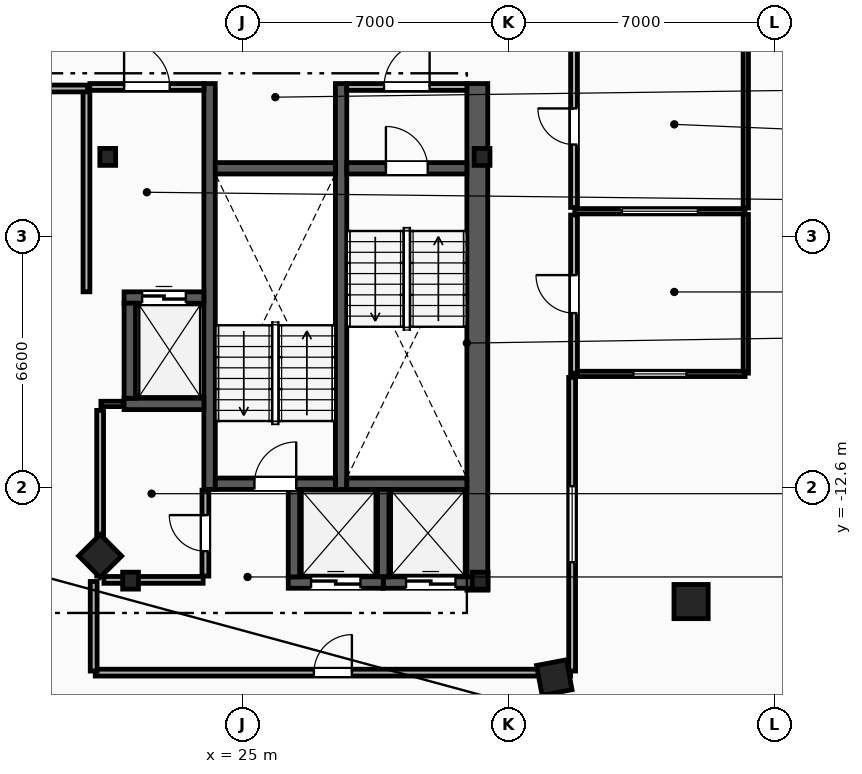
"""IFC4 building model, lengths in metres.
Left out: names, types, materials, properties, quantities, classifications, styles, units other than length and angle.
Written with IfcOpenShell. Run it as: python <this file> out.ifc"""

import sys

from ifc_helpers import new_model, si_unit, direction, frame, frame_2d, origin, origin_2d, place, context, subcontext, project, spatial, rectangle, i_section, extrude, element, fill, save


model = new_model("IFC4")
c1 = context("Model", 3, precision=1e-05, world=origin(), true_north=direction((0.0, 1.0)))
c2 = subcontext(c1, "Body", "Model", "MODEL_VIEW")
j1 = project(units=[si_unit("LENGTHUNIT", "METRE"), si_unit("PLANEANGLEUNIT", "RADIAN")], contexts=[c1])
p1 = place(None, origin())
s1 = spatial("IfcSite", under=j1, at=p1, CompositionType="ELEMENT")
p2 = place(p1, origin())
s2 = spatial("IfcBuilding", under=s1, at=p2, CompositionType="ELEMENT")
p3 = place(p2, frame((0.0, 0.0, 272.0)))
s3 = spatial("IfcBuildingStorey", under=s2, at=p3, CompositionType="ELEMENT", Elevation=272.0)
for number, where, z_axis, x_axis in (
    (1, (31.3, -3.9, 0.0), (0.0, 0.0, 1.0), (1.0, 0.0, 0.0)),
    (2, (21.45, -3.9, 0.0), (0.0, 0.0, 1.0), (1.0, 0.0, 0.0)),
    (3, (22.05, -15.05, 0.0), (0.0, 0.0, 1.0), (1.0, 0.0, 0.0)),
    (4, (31.25, -15.05, 0.0), (0.0, 0.0, 1.0), (1.0, 0.0, 0.0)),
):
    element("IfcColumn", number, at=place(p3, frame(where, z_axis=z_axis, x_axis=x_axis)), inside=s3, PredefinedType="COLUMN", context=c2, shape_type="SweptSolid", body=[
        extrude(i_section(OverallWidth=0.416, OverallDepth=0.446, WebThickness=0.039, FlangeThickness=0.063, FilletRadius=0.018, at=origin_2d()), origin(), (0.0, 0.0, 1.0), 3.6),
    ])
p4 = place(p3, frame((36.8, -15.6, 0.0), z_axis=(0.0, 0.0, 1.0), x_axis=(1.0, 0.0, 0.0)))
e5 = element("IfcColumn", 5, at=p4, inside=s3, PredefinedType="COLUMN", context=c2, shape_type="SweptSolid", body=[
    extrude(rectangle(XDim=0.9, YDim=0.9, at=origin_2d()), origin(), (0.0, 0.0, 1.0), 3.6),
])
for number, where, z_axis, x_axis in (
    (6, (21.25, -14.4, 0.0), (0.0, 0.0, 1.0), (0.703, -0.711, 0.0)),
    (7, (33.2, -17.6, 0.0), (0.0, 0.0, 1.0), (0.983, 0.186, 0.0)),
):
    element("IfcColumn", number, at=place(p3, frame(where, z_axis=z_axis, x_axis=x_axis)), inside=s3, PredefinedType="COLUMN", context=c2, shape_type="SweptSolid", body=[
        extrude(rectangle(XDim=0.8, YDim=0.8, at=origin_2d()), origin(), (0.0, 0.0, 1.0), 3.34),
    ])
p5 = place(p3, frame((31.175, -15.3, 0.0), z_axis=(0.0, 0.0, 1.0), x_axis=(0.0, 1.0, 0.0)))
e8 = element("IfcWall", 8, at=p5, inside=s3, PredefinedType="SHEAR", context=c2, shape_type="SweptSolid", body=[
    extrude(rectangle(XDim=13.33, YDim=0.55, at=frame_2d((6.665, 0.0))), origin(), (0.0, 0.0, 1.0), 3.34),
])
for number, where, z_axis, x_axis in (
    (9, (27.59, -12.65, 0.0), (0.0, 0.0, 1.0), (0.0, 1.0, 0.0)),
    (10, (24.13, -12.65, 0.0), (0.0, 0.0, 1.0), (0.0, 1.0, 0.0)),
):
    element("IfcWall", number, at=place(p3, frame(where, z_axis=z_axis, x_axis=x_axis)), inside=s3, PredefinedType="SHEAR", context=c2, shape_type="SweptSolid", body=[
        extrude(rectangle(XDim=10.68, YDim=0.3, at=frame_2d((5.34, 0.0))), origin(), (0.0, 0.0, 1.0), 3.34),
    ])
p6 = place(p3, frame((27.74, -4.2, 0.0), z_axis=(0.0, 0.0, 1.0), x_axis=(1.0, 0.0, 0.0)))
e11 = element("IfcWall", 11, at=p6, inside=s3, PredefinedType="SHEAR", context=c2, shape_type="SweptSolid", body=[
    extrude(rectangle(XDim=3.16, YDim=0.3, at=frame_2d((1.58, 0.0))), origin(), (0.0, 0.0, 1.0), 3.34),
])
p7 = place(p6, frame((1.03, 0.0, 0.0)))
e12 = element("IfcOpeningElement", 12, at=p7, cuts=e11, PredefinedType="OPENING", context=c2, shape_type="SweptSolid", body=[
    extrude(rectangle(XDim=1.1, YDim=2.15, at=frame_2d((0.55, 1.075))), frame((0.0, 0.16, 0.0), z_axis=(0.0, -1.0, 0.0), x_axis=(1.0, 0.0, 0.0)), (0.0, 0.0, 1.0), 0.32),
])
p8 = place(p3, frame((27.74, -12.5, 0.0), z_axis=(0.0, 0.0, 1.0), x_axis=(1.0, 0.0, 0.0)))
e13 = element("IfcWall", 13, at=p8, inside=s3, PredefinedType="SHEAR", context=c2, shape_type="SweptSolid", body=[
    extrude(rectangle(XDim=3.16, YDim=0.3, at=frame_2d((1.58, 0.0))), origin(), (0.0, 0.0, 1.0), 3.34),
])
p9 = place(p3, frame((24.28, -12.5, 0.0), z_axis=(0.0, 0.0, 1.0), x_axis=(1.0, 0.0, 0.0)))
e14 = element("IfcWall", 14, at=p9, inside=s3, PredefinedType="SHEAR", context=c2, shape_type="SweptSolid", body=[
    extrude(rectangle(XDim=3.16, YDim=0.3, at=frame_2d((1.58, 0.0))), origin(), (0.0, 0.0, 1.0), 3.34),
])
p10 = place(p9, frame((1.03, 0.0, 0.0)))
e15 = element("IfcOpeningElement", 15, at=p10, cuts=e14, PredefinedType="OPENING", context=c2, shape_type="SweptSolid", body=[
    extrude(rectangle(XDim=1.1, YDim=2.15, at=frame_2d((0.55, 1.075))), frame((0.0, 0.16, 0.0), z_axis=(0.0, -1.0, 0.0), x_axis=(1.0, 0.0, 0.0)), (0.0, 0.0, 1.0), 0.32),
])
p11 = place(p3, frame((24.28, -4.2, 0.0), z_axis=(0.0, 0.0, 1.0), x_axis=(1.0, 0.0, 0.0)))
e16 = element("IfcWall", 16, at=p11, inside=s3, PredefinedType="SHEAR", context=c2, shape_type="SweptSolid", body=[
    extrude(rectangle(XDim=3.16, YDim=0.3, at=frame_2d((1.58, 0.0))), origin(), (0.0, 0.0, 1.0), 3.34),
])
p12 = place(p3, frame((20.89, -7.45, 0.0), z_axis=(0.0, 0.0, 1.0), x_axis=(0.0, 1.0, 0.0)))
e17 = element("IfcWall", 17, at=p12, inside=s3, PredefinedType="PARTITIONING", context=c2, shape_type="SweptSolid", body=[
    extrude(rectangle(XDim=5.3, YDim=0.18, at=frame_2d((2.65, 0.0))), origin(), (0.0, 0.0, 1.0), 3.34),
])
p13 = place(p3, frame((20.98, -2.06, 0.0), z_axis=(0.0, 0.0, 1.0), x_axis=(1.0, 0.0, 0.0)))
e18 = element("IfcWall", 18, at=p13, inside=s3, PredefinedType="PARTITIONING", context=c2, shape_type="SweptSolid", body=[
    extrude(rectangle(XDim=3.0, YDim=0.18, at=frame_2d((1.5, 0.0))), origin(), (0.0, 0.0, 1.0), 3.34),
])
p14 = place(p13, frame((0.9, 0.0, 0.0)))
e19 = element("IfcOpeningElement", 19, at=p14, cuts=e18, PredefinedType="OPENING", context=c2, shape_type="SweptSolid", body=[
    extrude(rectangle(XDim=1.2, YDim=2.15, at=frame_2d((0.6, 1.075))), frame((0.0, 0.1, 0.0), z_axis=(0.0, -1.0, 0.0), x_axis=(1.0, 0.0, 0.0)), (0.0, 0.0, 1.0), 0.2),
])
p15 = place(p3, frame((27.74, -2.06, 0.0), z_axis=(0.0, 0.0, 1.0), x_axis=(1.0, 0.0, 0.0)))
e20 = element("IfcWall", 20, at=p15, inside=s3, PredefinedType="PARTITIONING", context=c2, shape_type="SweptSolid", body=[
    extrude(rectangle(XDim=3.16, YDim=0.18, at=frame_2d((1.58, 0.0))), origin(), (0.0, 0.0, 1.0), 3.34),
])
p16 = place(p15, frame((0.98, 0.0, 0.0)))
e21 = element("IfcOpeningElement", 21, at=p16, cuts=e20, PredefinedType="OPENING", context=c2, shape_type="SweptSolid", body=[
    extrude(rectangle(XDim=1.2, YDim=2.15, at=frame_2d((0.6, 1.075))), frame((0.0, 0.1, 0.0), z_axis=(0.0, -1.0, 0.0), x_axis=(1.0, 0.0, 0.0)), (0.0, 0.0, 1.0), 0.2),
])
p17 = place(p3, frame((21.88, -7.6, 0.0), z_axis=(0.0, 0.0, 1.0), x_axis=(1.0, 0.0, 0.0)))
e22 = element("IfcWall", 22, at=p17, inside=s3, PredefinedType="SHEAR", context=c2, shape_type="SweptSolid", body=[
    extrude(rectangle(XDim=2.1, YDim=0.3, at=frame_2d((1.05, 0.0))), origin(), (0.0, 0.0, 1.0), 3.34),
])
p18 = place(p17, frame((0.475, 0.0, 0.0)))
e23 = element("IfcOpeningElement", 23, at=p18, cuts=e22, PredefinedType="OPENING", context=c2, shape_type="SweptSolid", body=[
    extrude(rectangle(XDim=1.15, YDim=2.2, at=frame_2d((0.575, 1.1))), frame((0.0, 0.16, 0.0), z_axis=(0.0, -1.0, 0.0), x_axis=(1.0, 0.0, 0.0)), (0.0, 0.0, 1.0), 0.32),
])
p19 = place(p3, frame((21.88, -10.4, 0.0), z_axis=(0.0, 0.0, 1.0), x_axis=(1.0, 0.0, 0.0)))
e24 = element("IfcWall", 24, at=p19, inside=s3, PredefinedType="SHEAR", context=c2, shape_type="SweptSolid", body=[
    extrude(rectangle(XDim=2.1, YDim=0.3, at=frame_2d((1.05, 0.0))), origin(), (0.0, 0.0, 1.0), 3.34),
])
p20 = place(p3, frame((22.03, -10.25, 0.0), z_axis=(0.0, 0.0, 1.0), x_axis=(0.0, 1.0, 0.0)))
e25 = element("IfcWall", 25, at=p20, inside=s3, PredefinedType="SHEAR", context=c2, shape_type="SweptSolid", body=[
    extrude(rectangle(XDim=2.5, YDim=0.3, at=frame_2d((1.25, 0.0))), origin(), (0.0, 0.0, 1.0), 3.34),
])
p21 = place(p3, frame((28.7, -15.1, 0.0), z_axis=(0.0, 0.0, 1.0), x_axis=(1.0, 0.0, 0.0)))
e26 = element("IfcWall", 26, at=p21, inside=s3, PredefinedType="SHEAR", context=c2, shape_type="SweptSolid", body=[
    extrude(rectangle(XDim=2.5, YDim=0.3, at=frame_2d((1.25, 0.0))), origin(), (0.0, 0.0, 1.0), 3.34),
])
p22 = place(p21, frame((0.6, 0.0, 0.0)))
e27 = element("IfcOpeningElement", 27, at=p22, cuts=e26, PredefinedType="OPENING", context=c2, shape_type="SweptSolid", body=[
    extrude(rectangle(XDim=1.3, YDim=2.2, at=frame_2d((0.65, 1.1))), frame((0.0, 0.16, 0.0), z_axis=(0.0, -1.0, 0.0), x_axis=(1.0, 0.0, 0.0)), (0.0, 0.0, 1.0), 0.32),
])
p23 = place(p3, frame((28.7, -14.95, 0.0), z_axis=(0.0, 0.0, 1.0), x_axis=(0.0, 1.0, 0.0)))
e28 = element("IfcWall", 28, at=p23, inside=s3, PredefinedType="SHEAR", context=c2, shape_type="SweptSolid", body=[
    extrude(rectangle(XDim=2.3, YDim=0.3, at=frame_2d((1.15, 0.0))), origin(), (0.0, 0.0, 1.0), 3.34),
])
p24 = place(p3, frame((26.2, -15.1, 0.0), z_axis=(0.0, 0.0, 1.0), x_axis=(1.0, 0.0, 0.0)))
e29 = element("IfcWall", 29, at=p24, inside=s3, PredefinedType="SHEAR", context=c2, shape_type="SweptSolid", body=[
    extrude(rectangle(XDim=2.5, YDim=0.3, at=frame_2d((1.25, 0.0))), origin(), (0.0, 0.0, 1.0), 3.34),
])
p25 = place(p24, frame((0.6, 0.0, 0.0)))
e30 = element("IfcOpeningElement", 30, at=p25, cuts=e29, PredefinedType="OPENING", context=c2, shape_type="SweptSolid", body=[
    extrude(rectangle(XDim=1.3, YDim=2.2, at=frame_2d((0.65, 1.1))), frame((0.0, 0.16, 0.0), z_axis=(0.0, -1.0, 0.0), x_axis=(1.0, 0.0, 0.0)), (0.0, 0.0, 1.0), 0.32),
])
p26 = place(p3, frame((26.35, -14.95, 0.0), z_axis=(0.0, 0.0, 1.0), x_axis=(0.0, 1.0, 0.0)))
e31 = element("IfcWall", 31, at=p26, inside=s3, PredefinedType="SHEAR", context=c2, shape_type="SweptSolid", body=[
    extrude(rectangle(XDim=2.3, YDim=0.3, at=frame_2d((1.15, 0.0))), origin(), (0.0, 0.0, 1.0), 3.34),
])
p27 = place(p3, frame((21.27, -10.4, 0.0), z_axis=(0.0, 0.0, 1.0), x_axis=(1.0, 0.0, 0.0)))
e32 = element("IfcWall", 32, at=p27, inside=s3, PredefinedType="PARTITIONING", context=c2, shape_type="SweptSolid", body=[
    extrude(rectangle(XDim=0.59, YDim=0.14, at=frame_2d((0.295, 0.0))), origin(), (0.0, 0.0, 1.0), 3.34),
])
p28 = place(p3, frame((21.25, -14.93, 0.0), z_axis=(0.0, 0.0, 1.0), x_axis=(0.0, 1.0, 0.0)))
e33 = element("IfcWall", 33, at=p28, inside=s3, PredefinedType="PARTITIONING", context=c2, shape_type="SweptSolid", body=[
    extrude(rectangle(XDim=4.36, YDim=0.18, at=frame_2d((2.18, 0.0))), origin(), (0.0, 0.0, 1.0), 3.34),
])
p29 = place(p3, frame((21.35, -15.03, 0.0), z_axis=(0.0, 0.0, 1.0), x_axis=(1.0, 0.0, 0.0)))
e34 = element("IfcWall", 34, at=p29, inside=s3, PredefinedType="PARTITIONING", context=c2, shape_type="SweptSolid", body=[
    extrude(rectangle(XDim=2.61, YDim=0.18, at=frame_2d((1.305, 0.0))), origin(), (0.0, 0.0, 1.0), 2.413),
])
p30 = place(p3, frame((24.02, -14.93, 0.0), z_axis=(0.0, 0.0, 1.0), x_axis=(0.0, 1.0, 0.0)))
e35 = element("IfcWall", 35, at=p30, inside=s3, PredefinedType="PARTITIONING", context=c2, shape_type="SweptSolid", body=[
    extrude(rectangle(XDim=2.26, YDim=0.18, at=frame_2d((1.13, 0.0))), origin(), (0.0, 0.0, 1.0), 3.34),
])
p31 = place(p30, frame((0.655, 0.0, 0.0)))
e36 = element("IfcOpeningElement", 36, at=p31, cuts=e35, PredefinedType="OPENING", context=c2, shape_type="SweptSolid", body=[
    extrude(rectangle(XDim=0.95, YDim=2.1, at=frame_2d((0.475, 1.05))), frame((0.0, 0.1, 0.0), z_axis=(0.0, -1.0, 0.0), x_axis=(1.0, 0.0, 0.0)), (0.0, 0.0, 1.0), 0.2),
])
p32 = place(p3, frame((38.24, -9.59, 0.0), z_axis=(0.0, 0.0, 1.0), x_axis=(0.0, 1.0, 0.0)))
e37 = element("IfcWall", 37, at=p32, inside=s3, PredefinedType="PARTITIONING", context=c2, shape_type="SweptSolid", body=[
    extrude(rectangle(XDim=4.175, YDim=0.14, at=frame_2d((2.087, 0.0))), origin(), (0.0, 0.0, 1.0), 3.34),
])
p33 = place(p3, frame((38.24, -5.245, 0.0), z_axis=(0.0, 0.0, 1.0), x_axis=(0.0, 1.0, 0.0)))
e38 = element("IfcWall", 38, at=p33, inside=s3, PredefinedType="PARTITIONING", context=c2, shape_type="SweptSolid", body=[
    extrude(rectangle(XDim=4.275, YDim=0.14, at=frame_2d((2.138, 0.0))), origin(), (0.0, 0.0, 1.0), 3.34),
])
p34 = place(p3, frame((33.74, -5.33, 0.0), z_axis=(0.0, 0.0, 1.0), x_axis=(1.0, 0.0, 0.0)))
e39 = element("IfcWall", 39, at=p34, inside=s3, PredefinedType="PARTITIONING", context=c2, shape_type="SweptSolid", body=[
    extrude(rectangle(XDim=4.48, YDim=0.14, at=frame_2d((2.24, 0.0))), origin(), (0.0, 0.0, 1.0), 3.34),
])
p35 = place(p34, frame((1.24, 0.0, 1.05)))
e40 = element("IfcOpeningElement", 40, at=p35, cuts=e39, PredefinedType="OPENING", context=c2, shape_type="SweptSolid", body=[
    extrude(rectangle(XDim=2.0, YDim=1.5, at=frame_2d((1.0, 0.75))), frame((0.0, 0.08, 0.0), z_axis=(0.0, -1.0, 0.0), x_axis=(1.0, 0.0, 0.0)), (0.0, 0.0, 1.0), 0.16),
])
p36 = place(p3, frame((33.74, -9.61, 0.0), z_axis=(0.0, 0.0, 1.0), x_axis=(1.0, 0.0, 0.0)))
e41 = element("IfcWall", 41, at=p36, inside=s3, PredefinedType="PARTITIONING", context=c2, shape_type="SweptSolid", body=[
    extrude(rectangle(XDim=4.48, YDim=0.14, at=frame_2d((2.24, 0.0))), origin(), (0.0, 0.0, 1.0), 3.34),
])
p37 = place(p36, frame((1.54, 0.0, 1.05)))
e42 = element("IfcOpeningElement", 42, at=p37, cuts=e41, PredefinedType="OPENING", context=c2, shape_type="SweptSolid", body=[
    extrude(rectangle(XDim=1.4, YDim=1.5, at=frame_2d((0.7, 0.75))), frame((0.0, 0.08, 0.0), z_axis=(0.0, -1.0, 0.0), x_axis=(1.0, 0.0, 0.0)), (0.0, 0.0, 1.0), 0.16),
])
p38 = place(p3, frame((33.72, -5.23, 0.0), z_axis=(0.0, 0.0, 1.0), x_axis=(0.0, 1.0, 0.0)))
e43 = element("IfcWall", 43, at=p38, inside=s3, PredefinedType="PARTITIONING", context=c2, shape_type="SweptSolid", body=[
    extrude(rectangle(XDim=4.26, YDim=0.18, at=frame_2d((2.13, 0.0))), origin(), (0.0, 0.0, 1.0), 3.34),
])
p39 = place(p38, frame((1.655, 0.0, 0.0)))
e44 = element("IfcOpeningElement", 44, at=p39, cuts=e43, PredefinedType="OPENING", context=c2, shape_type="SweptSolid", body=[
    extrude(rectangle(XDim=0.95, YDim=2.1, at=frame_2d((0.475, 1.05))), frame((0.0, 0.1, 0.0), z_axis=(0.0, -1.0, 0.0), x_axis=(1.0, 0.0, 0.0)), (0.0, 0.0, 1.0), 0.2),
])
p40 = place(p3, frame((33.72, -9.59, 0.0), z_axis=(0.0, 0.0, 1.0), x_axis=(0.0, 1.0, 0.0)))
e45 = element("IfcWall", 45, at=p40, inside=s3, PredefinedType="PARTITIONING", context=c2, shape_type="SweptSolid", body=[
    extrude(rectangle(XDim=4.16, YDim=0.18, at=frame_2d((2.08, 0.0))), origin(), (0.0, 0.0, 1.0), 3.34),
])
p41 = place(p40, frame((1.58, 0.0, 0.0)))
e46 = element("IfcOpeningElement", 46, at=p41, cuts=e45, PredefinedType="OPENING", context=c2, shape_type="SweptSolid", body=[
    extrude(rectangle(XDim=1.0, YDim=2.15, at=frame_2d((0.5, 1.075))), frame((0.0, 0.1, 0.0), z_axis=(0.0, -1.0, 0.0), x_axis=(1.0, 0.0, 0.0)), (0.0, 0.0, 1.0), 0.2),
])
p42 = place(p3, frame((21.122, -17.47, 0.0), z_axis=(0.0, 0.0, 1.0), x_axis=(1.0, 0.0, 0.0)))
e47 = element("IfcWall", 47, at=p42, inside=s3, PredefinedType="PARTITIONING", context=c2, shape_type="SweptSolid", body=[
    extrude(rectangle(XDim=12.507, YDim=0.18, at=frame_2d((6.253, 0.0))), origin(), (0.0, 0.0, 1.0), 3.34),
])
p43 = place(p42, frame((5.753, 0.0, 0.0)))
e48 = element("IfcOpeningElement", 48, at=p43, cuts=e47, PredefinedType="OPENING", context=c2, shape_type="SweptSolid", body=[
    extrude(rectangle(XDim=1.0, YDim=2.15, at=frame_2d((0.5, 1.075))), frame((0.0, 0.1, 0.0), z_axis=(0.0, -1.0, 0.0), x_axis=(1.0, 0.0, 0.0)), (0.0, 0.0, 1.0), 0.2),
])
p44 = place(p3, frame((33.67, -17.428, 0.0), z_axis=(0.0, 0.0, 1.0), x_axis=(0.0, 1.0, 0.0)))
e49 = element("IfcWall", 49, at=p44, inside=s3, PredefinedType="PARTITIONING", context=c2, shape_type="SweptSolid", body=[
    extrude(rectangle(XDim=7.727, YDim=0.18, at=frame_2d((3.864, 0.0))), origin(), (0.0, 0.0, 1.0), 3.34),
])
p45 = place(p44, frame((2.864, 0.0, 1.05)))
e50 = element("IfcOpeningElement", 50, at=p45, cuts=e49, PredefinedType="OPENING", context=c2, shape_type="SweptSolid", body=[
    extrude(rectangle(XDim=2.0, YDim=1.5, at=frame_2d((1.0, 0.75))), frame((0.0, 0.1, 0.0), z_axis=(0.0, -1.0, 0.0), x_axis=(1.0, 0.0, 0.0)), (0.0, 0.0, 1.0), 0.2),
])
p46 = place(p3, frame((13.521, -2.1, 0.0), z_axis=(0.0, 0.0, 1.0), x_axis=(1.0, 0.0, 0.0)))
e51 = element("IfcWall", 51, at=p46, inside=s3, PredefinedType="PARTITIONING", context=c2, shape_type="SweptSolid", body=[
    extrude(rectangle(XDim=7.398, YDim=0.18, at=frame_2d((3.699, 0.0))), origin(), (0.0, 0.0, 1.0), 3.34),
])
p47 = place(p3, frame((21.08, -15.072, 0.0), z_axis=(0.0, 0.0, 1.0), x_axis=(0.0, -1.0, 0.0)))
e52 = element("IfcWall", 52, at=p47, inside=s3, PredefinedType="PARTITIONING", context=c2, shape_type="SweptSolid", body=[
    extrude(rectangle(XDim=2.357, YDim=0.18, at=frame_2d((1.178, 0.0))), origin(), (0.0, 0.0, 1.0), 3.34),
])
p48 = place(p7, origin())
e53 = element("IfcDoor", 53, at=p48, inside=s3, OperationType="SINGLE_SWING_LEFT", PredefinedType="DOOR", context=c2, shape_type="SweptSolid", body=[
    extrude(rectangle(XDim=1.1, YDim=2.15, at=frame_2d((0.55, 1.075))), frame((0.0, 0.025, 0.0), z_axis=(0.0, -1.0, 0.0), x_axis=(1.0, 0.0, 0.0)), (0.0, 0.0, 1.0), 0.05),
])
fill(e12, e53)
p49 = place(p10, origin())
e54 = element("IfcDoor", 54, at=p49, inside=s3, OperationType="SINGLE_SWING_RIGHT", PredefinedType="DOOR", context=c2, shape_type="SweptSolid", body=[
    extrude(rectangle(XDim=1.1, YDim=2.15, at=frame_2d((0.55, 1.075))), frame((0.0, 0.025, 0.0), z_axis=(0.0, -1.0, 0.0), x_axis=(1.0, 0.0, 0.0)), (0.0, 0.0, 1.0), 0.05),
])
fill(e15, e54)
p50 = place(p14, origin())
e55 = element("IfcDoor", 55, at=p50, inside=s3, OperationType="SINGLE_SWING_LEFT", PredefinedType="DOOR", context=c2, shape_type="SweptSolid", body=[
    extrude(rectangle(XDim=1.2, YDim=2.15, at=frame_2d((0.6, 1.075))), frame((0.0, 0.025, 0.0), z_axis=(0.0, -1.0, 0.0), x_axis=(1.0, 0.0, 0.0)), (0.0, 0.0, 1.0), 0.05),
])
fill(e19, e55)
p51 = place(p16, origin())
e56 = element("IfcDoor", 56, at=p51, inside=s3, OperationType="SINGLE_SWING_RIGHT", PredefinedType="DOOR", context=c2, shape_type="SweptSolid", body=[
    extrude(rectangle(XDim=1.2, YDim=2.15, at=frame_2d((0.6, 1.075))), frame((0.0, 0.025, 0.0), z_axis=(0.0, -1.0, 0.0), x_axis=(1.0, 0.0, 0.0)), (0.0, 0.0, 1.0), 0.05),
])
fill(e21, e56)
p52 = place(p18, origin())
e57 = element("IfcDoor", 57, at=p52, inside=s3, OperationType="SLIDING_TO_LEFT", PredefinedType="TRAPDOOR", context=c2, shape_type="SweptSolid", body=[
    extrude(rectangle(XDim=1.15, YDim=2.2, at=frame_2d((0.575, 1.1))), frame((0.0, 0.025, 0.0), z_axis=(0.0, -1.0, 0.0), x_axis=(1.0, 0.0, 0.0)), (0.0, 0.0, 1.0), 0.05),
])
fill(e23, e57)
p53 = place(p22, origin())
e58 = element("IfcDoor", 58, at=p53, inside=s3, OperationType="SLIDING_TO_LEFT", PredefinedType="TRAPDOOR", context=c2, shape_type="SweptSolid", body=[
    extrude(rectangle(XDim=1.3, YDim=2.2, at=frame_2d((0.65, 1.1))), frame((0.0, 0.025, 0.0), z_axis=(0.0, -1.0, 0.0), x_axis=(1.0, 0.0, 0.0)), (0.0, 0.0, 1.0), 0.05),
])
fill(e27, e58)
p54 = place(p25, origin())
e59 = element("IfcDoor", 59, at=p54, inside=s3, OperationType="SLIDING_TO_LEFT", PredefinedType="TRAPDOOR", context=c2, shape_type="SweptSolid", body=[
    extrude(rectangle(XDim=1.3, YDim=2.2, at=frame_2d((0.65, 1.1))), frame((0.0, 0.025, 0.0), z_axis=(0.0, -1.0, 0.0), x_axis=(1.0, 0.0, 0.0)), (0.0, 0.0, 1.0), 0.05),
])
fill(e30, e59)
p55 = place(p43, origin())
e60 = element("IfcDoor", 60, at=p55, inside=s3, OperationType="SINGLE_SWING_RIGHT", PredefinedType="DOOR", context=c2, shape_type="SweptSolid", body=[
    extrude(rectangle(XDim=1.0, YDim=2.15, at=frame_2d((0.5, 1.075))), frame((0.0, 0.025, 0.0), z_axis=(0.0, -1.0, 0.0), x_axis=(1.0, 0.0, 0.0)), (0.0, 0.0, 1.0), 0.05),
])
fill(e48, e60)
p56 = place(p39, origin())
e61 = element("IfcDoor", 61, at=p56, inside=s3, OperationType="SINGLE_SWING_RIGHT", PredefinedType="DOOR", context=c2, shape_type="SweptSolid", body=[
    extrude(rectangle(XDim=0.95, YDim=2.1, at=frame_2d((0.475, 1.05))), frame((0.0, 0.025, 0.0), z_axis=(0.0, -1.0, 0.0), x_axis=(1.0, 0.0, 0.0)), (0.0, 0.0, 1.0), 0.05),
])
fill(e44, e61)
p57 = place(p41, origin())
e62 = element("IfcDoor", 62, at=p57, inside=s3, OperationType="SINGLE_SWING_RIGHT", PredefinedType="DOOR", context=c2, shape_type="SweptSolid", body=[
    extrude(rectangle(XDim=1.0, YDim=2.15, at=frame_2d((0.5, 1.075))), frame((0.0, 0.025, 0.0), z_axis=(0.0, -1.0, 0.0), x_axis=(1.0, 0.0, 0.0)), (0.0, 0.0, 1.0), 0.05),
])
fill(e46, e62)
p58 = place(p31, origin())
e63 = element("IfcDoor", 63, at=p58, inside=s3, OperationType="SINGLE_SWING_RIGHT", PredefinedType="DOOR", context=c2, shape_type="SweptSolid", body=[
    extrude(rectangle(XDim=0.95, YDim=2.1, at=frame_2d((0.475, 1.05))), frame((0.0, 0.025, 0.0), z_axis=(0.0, -1.0, 0.0), x_axis=(1.0, 0.0, 0.0)), (0.0, 0.0, 1.0), 0.05),
])
fill(e36, e63)
p59 = place(p35, origin())
e64 = element("IfcWindow", 64, at=p59, inside=s3, PartitioningType="SINGLE_PANEL", PredefinedType="WINDOW", context=c2, shape_type="SweptSolid", body=[
    extrude(rectangle(XDim=2.0, YDim=1.5, at=frame_2d((1.0, 0.75))), frame((0.0, 0.03, 0.0), z_axis=(0.0, -1.0, 0.0), x_axis=(1.0, 0.0, 0.0)), (0.0, 0.0, 1.0), 0.06),
])
fill(e40, e64)
p60 = place(p37, origin())
e65 = element("IfcWindow", 65, at=p60, inside=s3, PartitioningType="SINGLE_PANEL", PredefinedType="WINDOW", context=c2, shape_type="SweptSolid", body=[
    extrude(rectangle(XDim=1.4, YDim=1.5, at=frame_2d((0.7, 0.75))), frame((0.0, 0.03, 0.0), z_axis=(0.0, -1.0, 0.0), x_axis=(1.0, 0.0, 0.0)), (0.0, 0.0, 1.0), 0.06),
])
fill(e42, e65)
p61 = place(p45, origin())
e66 = element("IfcWindow", 66, at=p61, inside=s3, PartitioningType="SINGLE_PANEL", PredefinedType="WINDOW", context=c2, shape_type="SweptSolid", body=[
    extrude(rectangle(XDim=2.0, YDim=1.5, at=frame_2d((1.0, 0.75))), frame((0.0, 0.03, 0.0), z_axis=(0.0, -1.0, 0.0), x_axis=(1.0, 0.0, 0.0)), (0.0, 0.0, 1.0), 0.06),
])
fill(e50, e66)
save(model, sys.argv[1])
